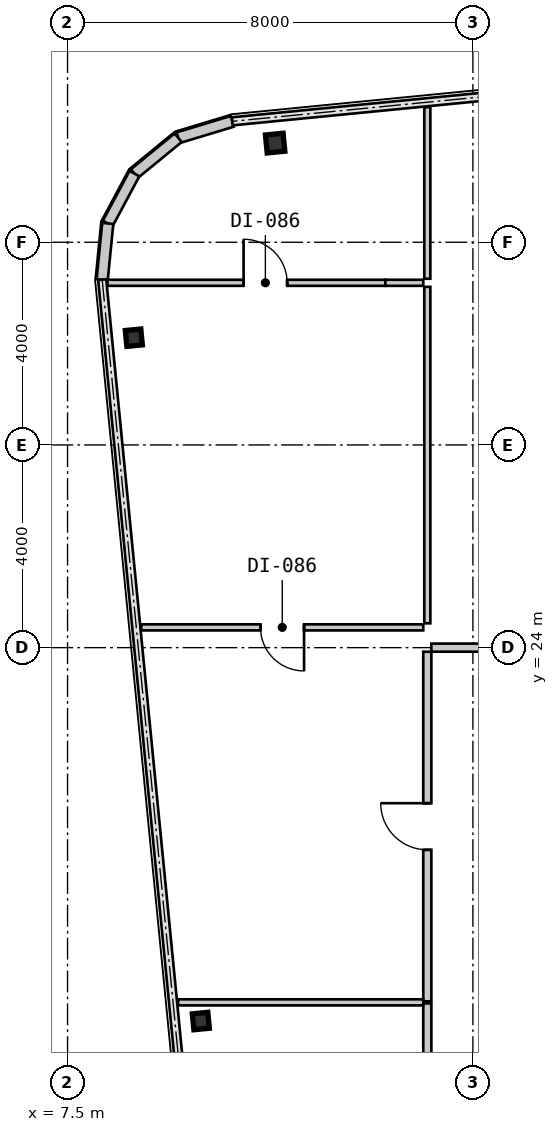
"""IFC4 building model, lengths in metres.
Left out: names, types, materials, properties, quantities, classifications, styles, units other than length and angle.
Written with IfcOpenShell. Run it as: python <this file> out.ifc"""

import sys

from ifc_helpers import new_model, si_unit, direction, frame, frame_2d, origin, origin_2d, place, context, subcontext, project, spatial, rectangle, i_section, extrude, source, transform, mapped, element, fill, save


model = new_model("IFC4")
c1 = context("Model", 3, precision=1e-05, world=origin(), true_north=direction((0.0, 1.0)))
c2 = subcontext(c1, "Body", "Model", "MODEL_VIEW")
j1 = project(units=[si_unit("LENGTHUNIT", "METRE"), si_unit("PLANEANGLEUNIT", "RADIAN")], contexts=[c1])
p1 = place(None, origin())
s1 = spatial("IfcSite", under=j1, at=p1, CompositionType="ELEMENT")
p2 = place(p1, origin())
s2 = spatial("IfcBuilding", under=s1, at=p2, CompositionType="ELEMENT")
p3 = place(p2, frame((0.0, 0.0, 93.45)))
s3 = spatial("IfcBuildingStorey", under=s2, at=p3, CompositionType="ELEMENT", Elevation=93.45)
m1 = source(origin(), c2, "Body", "SweptSolid", [
    extrude(i_section(OverallWidth=0.35, OverallDepth=0.356, WebThickness=0.018, FlangeThickness=0.028, at=origin_2d()), origin(), (0.0, 0.0, 1.0), 3.15),
])
p4 = place(p3, frame((11.597, 33.957, 0.0), z_axis=(0.0, 0.0, 1.0), x_axis=(0.995227399982, 0.097582899759, 0.0)))
e1 = element("IfcColumn", 1, at=p4, inside=s3, PredefinedType="COLUMN", context=c2, shape_type="MappedRepresentation", body=[
    mapped(m1, transform((0.0, 0.0, 0.0), scale=1.0)),
])
m2 = source(origin(), c2, "Body", "SweptSolid", [
    extrude(i_section(OverallWidth=0.307, OverallDepth=0.315, WebThickness=0.012, FlangeThickness=0.019, at=origin_2d()), origin(), (0.0, 0.0, 1.0), 3.15),
])
for number, where, z_axis, x_axis in (
    (2, (10.131, 16.631, 0.0), (0.0, 0.0, 1.0), (0.995, 0.098, 0.0)),
    (3, (8.808, 30.116, 0.0), (0.0, 0.0, 1.0), (0.995, 0.098, 0.0)),
):
    element("IfcColumn", number, at=place(p3, frame(where, z_axis=z_axis, x_axis=x_axis)), inside=s3, PredefinedType="COLUMN", context=c2, shape_type="MappedRepresentation", body=[
        mapped(m2, transform((0.0, 0.0, 0.0), scale=1.0)),
    ])
m3 = source(origin(), c2, "Body", "SweptSolid", [
    extrude(rectangle(XDim=1.116, YDim=0.22, at=frame_2d((0.558, 0.0))), origin(), (0.0, 0.0, 1.0), 2.93),
])
p5 = place(p3, frame((10.751, 34.386, 0.0), z_axis=(0.0, 0.0, 1.0), x_axis=(-0.957070388811, -0.289855603468, 0.0)))
e4 = element("IfcWall", 4, at=p5, inside=s3, PredefinedType="SOLIDWALL", context=c2, shape_type="MappedRepresentation", body=[
    mapped(m3, transform((0.0, 0.0, 0.0), scale=1.0)),
])
m4 = source(origin(), c2, "Body", "SweptSolid", [
    extrude(rectangle(XDim=1.116, YDim=0.22, at=frame_2d((0.558, 0.0))), origin(), (0.0, 0.0, 1.0), 2.93),
])
p6 = place(p3, frame((9.683, 34.063, 0.0), z_axis=(0.0, 0.0, 1.0), x_axis=(-0.773254916409, -0.634095287989, 0.0)))
e5 = element("IfcWall", 5, at=p6, inside=s3, PredefinedType="SOLIDWALL", context=c2, shape_type="MappedRepresentation", body=[
    mapped(m4, transform((0.0, 0.0, 0.0), scale=1.0)),
])
m5 = source(origin(), c2, "Body", "SweptSolid", [
    extrude(rectangle(XDim=1.116, YDim=0.22, at=frame_2d((0.558, 0.0))), origin(), (0.0, 0.0, 1.0), 2.93),
])
p7 = place(p3, frame((8.82, 33.355, 0.0), z_axis=(0.0, 0.0, 1.0), x_axis=(-0.471802540493, -0.881704237704, 0.0)))
e6 = element("IfcWall", 6, at=p7, inside=s3, PredefinedType="SOLIDWALL", context=c2, shape_type="MappedRepresentation", body=[
    mapped(m5, transform((0.0, 0.0, 0.0), scale=1.0)),
])
p8 = place(p3, frame((8.293, 32.371, 0.0), z_axis=(0.0, 0.0, 1.0), x_axis=(-0.098463783145, -0.99514063499, 0.0)))
e7 = element("IfcWall", 7, at=p8, inside=s3, PredefinedType="SOLIDWALL", context=c2, shape_type="MappedRepresentation", body=[
    mapped(m4, transform((0.0, 0.0, 0.0), scale=1.0)),
])
m6 = source(origin(), c2, "Body", "SweptSolid", [
    extrude(rectangle(XDim=6.201, YDim=0.16, at=frame_2d((3.101, 0.0))), origin(), (0.0, 0.0, 1.0), 2.93),
])
p9 = place(p3, frame((14.6, 10.778, 0.0), z_axis=(0.0, 0.0, 1.0), x_axis=(0.0, 1.0, 0.0)))
e8 = element("IfcWall", 8, at=p9, inside=s3, PredefinedType="PARTITIONING", context=c2, shape_type="MappedRepresentation", body=[
    mapped(m6, transform((0.0, 0.0, 0.0), scale=1.0)),
])
m7 = source(origin(), c2, "Body", "SweptSolid", [
    extrude(rectangle(XDim=0.92, YDim=2.1, at=frame_2d((0.46, 1.05))), frame((0.0, 0.09, 0.0), z_axis=(0.0, -1.0, 0.0), x_axis=(1.0, 0.0, 0.0)), (0.0, 0.0, 1.0), 0.18),
])
p10 = place(p9, frame((1.892, 0.0, 0.0)))
e9 = element("IfcOpeningElement", 9, at=p10, cuts=e8, PredefinedType="OPENING", context=c2, shape_type="MappedRepresentation", body=[
    mapped(m7, transform((0.0, 0.0, 0.0), scale=1.0)),
])
m8 = source(origin(), c2, "Body", "SweptSolid", [
    extrude(rectangle(XDim=6.9, YDim=0.16, at=frame_2d((3.45, 0.0))), origin(), (0.0, 0.0, 1.0), 2.93),
])
p11 = place(p3, frame((14.6, 17.02, 0.0), z_axis=(0.0, 0.0, 1.0), x_axis=(0.0, 1.0, 0.0)))
e10 = element("IfcWall", 10, at=p11, inside=s3, PredefinedType="PARTITIONING", context=c2, shape_type="MappedRepresentation", body=[
    mapped(m8, transform((0.0, 0.0, 0.0), scale=1.0)),
])
p12 = place(p11, frame((2.99, 0.0, 0.0)))
e11 = element("IfcOpeningElement", 11, at=p12, cuts=e10, PredefinedType="OPENING", context=c2, shape_type="MappedRepresentation", body=[
    mapped(m7, transform((0.0, 0.0, 0.0), scale=1.0)),
])
m9 = source(origin(), c2, "Body", "SweptSolid", [
    extrude(rectangle(XDim=4.17, YDim=0.16, at=frame_2d((2.085, 0.0))), origin(), (0.0, 0.0, 1.0), 2.93),
])
p13 = place(p3, frame((14.68, 24.0, 0.0), z_axis=(0.0, 0.0, 1.0), x_axis=(1.0, 0.0, 0.0)))
e12 = element("IfcWall", 12, at=p13, inside=s3, PredefinedType="PARTITIONING", context=c2, shape_type="MappedRepresentation", body=[
    mapped(m9, transform((0.0, 0.0, 0.0), scale=1.0)),
])
p14 = place(p13, frame((1.69, 0.0, 0.0)))
e13 = element("IfcOpeningElement", 13, at=p14, cuts=e12, PredefinedType="OPENING", context=c2, shape_type="MappedRepresentation", body=[
    mapped(m7, transform((0.0, 0.0, 0.0), scale=1.0)),
])
m10 = source(origin(), c2, "Body", "SweptSolid", [
    extrude(rectangle(XDim=4.84, YDim=0.12, at=frame_2d((2.42, 0.0))), origin(), (0.0, 0.0, 1.0), 2.93),
])
p15 = place(p3, frame((9.68, 17.0, 0.0), z_axis=(0.0, 0.0, 1.0), x_axis=(1.0, 0.0, 0.0)))
e14 = element("IfcWall", 14, at=p15, inside=s3, PredefinedType="PARTITIONING", context=c2, shape_type="MappedRepresentation", body=[
    mapped(m10, transform((0.0, 0.0, 0.0), scale=1.0)),
])
m11 = source(origin(), c2, "Body", "SweptSolid", [
    extrude(rectangle(XDim=5.565, YDim=0.12, at=frame_2d((2.783, 0.0))), origin(), (0.0, 0.0, 1.0), 2.93),
])
p16 = place(p3, frame((8.955, 24.4, 0.0), z_axis=(0.0, 0.0, 1.0), x_axis=(1.0, 0.0, 0.0)))
e15 = element("IfcWall", 15, at=p16, inside=s3, PredefinedType="PARTITIONING", context=c2, shape_type="MappedRepresentation", body=[
    mapped(m11, transform((0.0, 0.0, 0.0), scale=1.0)),
])
m12 = source(origin(), c2, "Body", "SweptSolid", [
    extrude(rectangle(XDim=0.86, YDim=2.1, at=frame_2d((0.43, 1.05))), frame((0.0, 0.07, 0.0), z_axis=(0.0, -1.0, 0.0), x_axis=(1.0, 0.0, 0.0)), (0.0, 0.0, 1.0), 0.14),
])
p17 = place(p16, frame((2.353, 0.0, 0.0)))
e16 = element("IfcOpeningElement", 16, at=p17, cuts=e15, PredefinedType="OPENING", context=c2, shape_type="MappedRepresentation", body=[
    mapped(m12, transform((0.0, 0.0, 0.0), scale=1.0)),
])
m13 = source(origin(), c2, "Body", "SweptSolid", [
    extrude(rectangle(XDim=5.484, YDim=0.12, at=frame_2d((2.742, 0.0))), origin(), (0.0, 0.0, 1.0), 2.93),
])
p18 = place(p3, frame((8.288, 31.2, 0.0), z_axis=(0.0, 0.0, 1.0), x_axis=(1.0, 0.0, 0.0)))
e17 = element("IfcWall", 17, at=p18, inside=s3, PredefinedType="PARTITIONING", context=c2, shape_type="MappedRepresentation", body=[
    mapped(m13, transform((0.0, 0.0, 0.0), scale=1.0)),
])
p19 = place(p18, frame((2.686, 0.0, 0.0)))
e18 = element("IfcOpeningElement", 18, at=p19, cuts=e17, PredefinedType="OPENING", context=c2, shape_type="MappedRepresentation", body=[
    mapped(m12, transform((0.0, 0.0, 0.0), scale=1.0)),
])
m14 = source(origin(), c2, "Body", "SweptSolid", [
    extrude(rectangle(XDim=0.748, YDim=0.12, at=frame_2d((0.374, 0.0))), origin(), (0.0, 0.0, 1.0), 2.397),
])
p20 = place(p3, frame((13.772, 31.2, 0.0), z_axis=(0.0, 0.0, 1.0), x_axis=(1.0, 0.0, 0.0)))
e19 = element("IfcWall", 19, at=p20, inside=s3, PredefinedType="PARTITIONING", context=c2, shape_type="MappedRepresentation", body=[
    mapped(m14, transform((0.0, 0.0, 0.0), scale=1.0)),
])
m15 = source(origin(), c2, "Body", "SweptSolid", [
    extrude(rectangle(XDim=6.64, YDim=0.12, at=frame_2d((3.32, 0.0))), origin(), (0.0, 0.0, 1.0), 2.93),
])
p21 = place(p3, frame((14.6, 31.12, 0.0), z_axis=(0.0, 0.0, 1.0), x_axis=(0.0, -1.0, 0.0)))
e20 = element("IfcWall", 20, at=p21, inside=s3, PredefinedType="PARTITIONING", context=c2, shape_type="MappedRepresentation", body=[
    mapped(m15, transform((0.0, 0.0, 0.0), scale=1.0)),
])
m16 = source(origin(), c2, "Body", "SweptSolid", [
    extrude(rectangle(XDim=3.385, YDim=0.12, at=frame_2d((1.693, 0.0))), origin(), (0.0, 0.0, 1.0), 2.93),
])
p22 = place(p3, frame((14.6, 34.666, 0.0), z_axis=(0.0, 0.0, 1.0), x_axis=(0.0, -1.0, 0.0)))
e21 = element("IfcWall", 21, at=p22, inside=s3, PredefinedType="PARTITIONING", context=c2, shape_type="MappedRepresentation", body=[
    mapped(m16, transform((0.0, 0.0, 0.0), scale=1.0)),
])
m17 = source(origin(), c2, "Body", "SweptSolid", [
    extrude(rectangle(XDim=0.92, YDim=2.1, at=frame_2d((0.46, 1.05))), frame((0.0, 0.025, 0.0), z_axis=(0.0, -1.0, 0.0), x_axis=(1.0, 0.0, 0.0)), (0.0, 0.0, 1.0), 0.05),
])
p23 = place(p12, origin())
e22 = element("IfcDoor", 22, at=p23, inside=s3, OperationType="SINGLE_SWING_RIGHT", PredefinedType="DOOR", context=c2, shape_type="MappedRepresentation", body=[
    mapped(m17, transform((0.0, 0.0, 0.0), scale=1.0)),
])
fill(e11, e22)
m18 = source(origin(), c2, "Body", "SweptSolid", [
    extrude(rectangle(XDim=0.86, YDim=2.1, at=frame_2d((0.43, 1.05))), frame((0.0, 0.025, 0.0), z_axis=(0.0, -1.0, 0.0), x_axis=(1.0, 0.0, 0.0)), (0.0, 0.0, 1.0), 0.05),
])
p24 = place(p17, frame((0.86, 0.0, 0.0), z_axis=(0.0, 0.0, 1.0), x_axis=(-1.0, 0.0, 0.0)))
e23 = element("IfcDoor", 23, at=p24, inside=s3, OperationType="SINGLE_SWING_LEFT", PredefinedType="DOOR", context=c2, shape_type="MappedRepresentation", body=[
    mapped(m18, transform((0.0, 0.0, 0.0), scale=1.0)),
])
fill(e16, e23)
p25 = place(p19, origin())
e24 = element("IfcDoor", 24, at=p25, inside=s3, OperationType="SINGLE_SWING_LEFT", PredefinedType="DOOR", context=c2, shape_type="MappedRepresentation", body=[
    mapped(m18, transform((0.0, 0.0, 0.0), scale=1.0)),
])
fill(e18, e24)
save(model, sys.argv[1])
